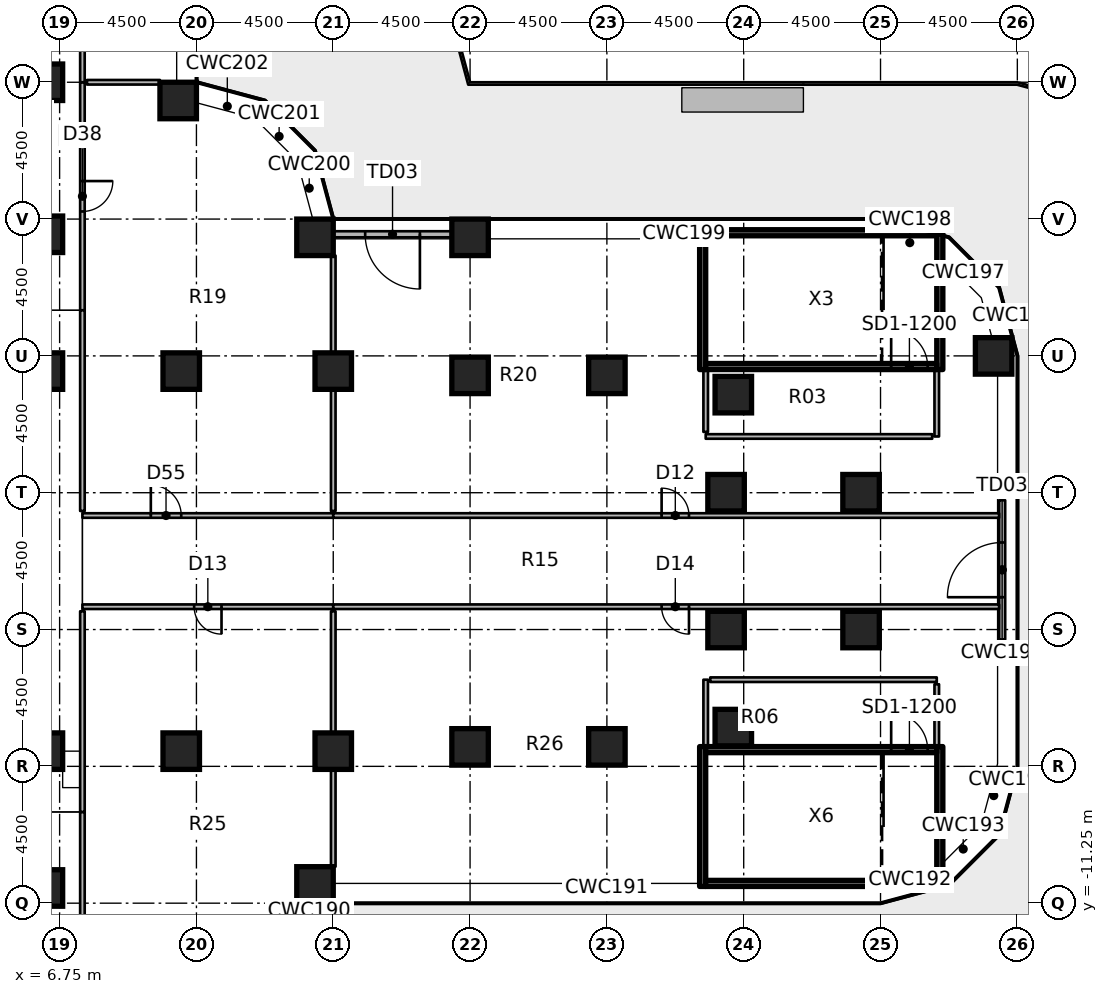
"""IFC4 building model, lengths in metres.
Left out: names, types, materials, properties, quantities, classifications, styles, units other than length and angle.
Written with IfcOpenShell. Run it as: python <this file> out.ifc"""

import sys

from ifc_helpers import new_model, si_unit, direction, frame, frame_2d, origin, origin_2d, place, context, subcontext, project, spatial, rectangle, extrude, element, fill, save


model = new_model("IFC4")
c1 = context("Model", 3, precision=1e-05, world=origin(), true_north=direction((0.0, 1.0)))
c2 = subcontext(c1, "Body", "Model", "MODEL_VIEW")
j1 = project(units=[si_unit("LENGTHUNIT", "METRE"), si_unit("PLANEANGLEUNIT", "RADIAN")], contexts=[c1])
p1 = place(None, origin())
s1 = spatial("IfcSite", under=j1, at=p1, CompositionType="ELEMENT")
p2 = place(p1, origin())
s2 = spatial("IfcBuilding", under=s1, at=p2, CompositionType="ELEMENT")
p3 = place(p2, frame((0.0, 0.0, 22.0)))
s3 = spatial("IfcBuildingStorey", under=s2, at=p3, CompositionType="ELEMENT", Elevation=22.0)
for number, where, z_axis, x_axis in (
    (1, (6.25, -10.75, 0.0), (0.0, 0.0, 1.0), (1.0, 0.0, 0.0)),
    (2, (6.25, -6.25, 0.0), (0.0, 0.0, 1.0), (1.0, 0.0, 0.0)),
    (3, (6.25, 6.25, 0.0), (0.0, 0.0, 1.0), (1.0, 0.0, 0.0)),
    (4, (6.25, 10.75, 0.0), (0.0, 0.0, 1.0), (1.0, 0.0, 0.0)),
    (5, (6.25, 15.75, 0.0), (0.0, 0.0, 1.0), (1.0, 0.0, 0.0)),
    (6, (10.75, -6.25, 0.0), (0.0, 0.0, 1.0), (1.0, 0.0, 0.0)),
    (7, (10.75, 6.25, 0.0), (0.0, 0.0, 1.0), (1.0, 0.0, 0.0)),
):
    element("IfcColumn", number, at=place(p3, frame(where, z_axis=z_axis, x_axis=x_axis)), inside=s3, PredefinedType="COLUMN", context=c2, shape_type="SweptSolid", body=[
        extrude(rectangle(XDim=1.2, YDim=1.2, at=origin_2d()), origin(), (0.0, 0.0, 1.0), 4.85),
    ])
for number, where, z_axis, x_axis in (
    (8, (10.65, 15.15, 0.0), (0.0, 0.0, 1.0), (1.0, 0.0, 0.0)),
    (9, (15.15, -10.65, 0.0), (0.0, 0.0, 1.0), (1.0, 0.0, 0.0)),
):
    element("IfcColumn", number, at=place(p3, frame(where, z_axis=z_axis, x_axis=x_axis)), inside=s3, PredefinedType="COLUMN", context=c2, shape_type="SweptSolid", body=[
        extrude(rectangle(XDim=1.2, YDim=1.2, at=origin_2d()), origin(), (0.0, 0.0, 1.0), 4.55),
    ])
for number, where, z_axis, x_axis in (
    (10, (15.75, -6.25, 0.0), (0.0, 0.0, 1.0), (1.0, 0.0, 0.0)),
    (11, (15.75, 6.25, 0.0), (0.0, 0.0, 1.0), (1.0, 0.0, 0.0)),
):
    element("IfcColumn", number, at=place(p3, frame(where, z_axis=z_axis, x_axis=x_axis)), inside=s3, PredefinedType="COLUMN", context=c2, shape_type="SweptSolid", body=[
        extrude(rectangle(XDim=1.2, YDim=1.2, at=origin_2d()), origin(), (0.0, 0.0, 1.0), 4.85),
    ])
p4 = place(p3, frame((15.15, 10.65, 0.0), z_axis=(0.0, 0.0, 1.0), x_axis=(1.0, 0.0, 0.0)))
e12 = element("IfcColumn", 12, at=p4, inside=s3, PredefinedType="COLUMN", context=c2, shape_type="SweptSolid", body=[
    extrude(rectangle(XDim=1.2, YDim=1.2, at=origin_2d()), origin(), (0.0, 0.0, 1.0), 4.55),
])
for number, where, z_axis, x_axis in (
    (13, (20.25, -6.11, 0.0), (0.0, 0.0, 1.0), (1.0, 0.0, 0.0)),
    (14, (20.25, 6.11, 0.0), (0.0, 0.0, 1.0), (1.0, 0.0, 0.0)),
):
    element("IfcColumn", number, at=place(p3, frame(where, z_axis=z_axis, x_axis=x_axis)), inside=s3, PredefinedType="COLUMN", context=c2, shape_type="SweptSolid", body=[
        extrude(rectangle(XDim=1.2, YDim=1.2, at=origin_2d()), origin(), (0.0, 0.0, 1.0), 4.85),
    ])
p5 = place(p3, frame((20.25, 10.65, 0.0), z_axis=(0.0, 0.0, 1.0), x_axis=(1.0, 0.0, 0.0)))
e15 = element("IfcColumn", 15, at=p5, inside=s3, PredefinedType="COLUMN", context=c2, shape_type="SweptSolid", body=[
    extrude(rectangle(XDim=1.2, YDim=1.2, at=origin_2d()), origin(), (0.0, 0.0, 1.0), 4.55),
])
for number, where, z_axis, x_axis in (
    (16, (24.75, -6.11, 0.0), (0.0, 0.0, 1.0), (1.0, 0.0, 0.0)),
    (17, (24.75, 6.11, 0.0), (0.0, 0.0, 1.0), (1.0, 0.0, 0.0)),
    (18, (28.908, -5.475, 0.0), (0.0, 0.0, 1.0), (1.0, 0.0, 0.0)),
    (19, (28.67, -2.25, 0.0), (0.0, 0.0, 1.0), (1.0, 0.0, 0.0)),
    (20, (28.67, 2.25, 0.0), (0.0, 0.0, 1.0), (1.0, 0.0, 0.0)),
    (21, (28.908, 5.475, 0.0), (0.0, 0.0, 1.0), (1.0, 0.0, 0.0)),
    (22, (33.11, -2.25, 0.0), (0.0, 0.0, 1.0), (1.0, 0.0, 0.0)),
    (23, (33.11, 2.25, 0.0), (0.0, 0.0, 1.0), (1.0, 0.0, 0.0)),
):
    element("IfcColumn", number, at=place(p3, frame(where, z_axis=z_axis, x_axis=x_axis)), inside=s3, PredefinedType="COLUMN", context=c2, shape_type="SweptSolid", body=[
        extrude(rectangle(XDim=1.2, YDim=1.2, at=origin_2d()), origin(), (0.0, 0.0, 1.0), 4.85),
    ])
p6 = place(p3, frame((37.47, 6.75, 0.0), z_axis=(0.0, 0.0, 1.0), x_axis=(1.0, 0.0, 0.0)))
e24 = element("IfcColumn", 24, at=p6, inside=s3, PredefinedType="COLUMN", context=c2, shape_type="SweptSolid", body=[
    extrude(rectangle(XDim=1.2, YDim=1.2, at=origin_2d()), origin(), (0.0, 0.0, 1.0), 4.55),
])
p7 = place(p3, frame((37.75, -2.577, 0.0), z_axis=(0.0, 0.0, 1.0), x_axis=(0.0, 1.0, 0.0)))
e25 = element("IfcWall", 25, at=p7, inside=s3, PredefinedType="SOLIDWALL", context=c2, shape_type="SweptSolid", body=[
    extrude(rectangle(XDim=4.58, YDim=0.2, at=frame_2d((2.29, 0.0))), origin(), (0.0, 0.0, 1.0), 3.95),
])
p8 = place(p7, frame((1.39, 0.0, 0.0)))
e26 = element("IfcOpeningElement", 26, at=p8, cuts=e25, PredefinedType="OPENING", context=c2, shape_type="SweptSolid", body=[
    extrude(rectangle(XDim=1.8, YDim=2.4, at=frame_2d((0.9, 1.2))), frame((0.0, 0.11, 0.0), z_axis=(0.0, -1.0, 0.0), x_axis=(1.0, 0.0, 0.0)), (0.0, 0.0, 1.0), 0.22),
])
p9 = place(p3, frame((19.65, 10.75, 0.0), z_axis=(0.0, 0.0, 1.0), x_axis=(-1.0, 0.0, 0.0)))
e27 = element("IfcWall", 27, at=p9, inside=s3, PredefinedType="SOLIDWALL", context=c2, shape_type="SweptSolid", body=[
    extrude(rectangle(XDim=3.9, YDim=0.2, at=frame_2d((1.95, 0.0))), origin(), (0.0, 0.0, 1.0), 3.95),
])
p10 = place(p9, frame((1.05, 0.0, 0.0)))
e28 = element("IfcOpeningElement", 28, at=p10, cuts=e27, PredefinedType="OPENING", context=c2, shape_type="SweptSolid", body=[
    extrude(rectangle(XDim=1.8, YDim=2.4, at=frame_2d((0.9, 1.2))), frame((0.0, 0.11, 0.0), z_axis=(0.0, -1.0, 0.0), x_axis=(1.0, 0.0, 0.0)), (0.0, 0.0, 1.0), 0.22),
])
for number, where, z_axis, x_axis in (
    (29, (27.9, 6.3, 0.0), (0.0, 0.0, 1.0), (0.0, 1.0, 0.0)),
    (30, (35.7, 6.3, 0.0), (0.0, 0.0, 1.0), (0.0, 1.0, 0.0)),
):
    element("IfcWall", number, at=place(p3, frame(where, z_axis=z_axis, x_axis=x_axis)), inside=s3, PredefinedType="SHEAR", context=c2, shape_type="SweptSolid", body=[
        extrude(rectangle(XDim=4.6, YDim=0.2, at=frame_2d((2.3, 0.0))), origin(), (0.0, 0.0, 1.0), 4.55),
    ])
p11 = place(p3, frame((28.0, 6.4, 0.0), z_axis=(0.0, 0.0, 1.0), x_axis=(1.0, 0.0, 0.0)))
e31 = element("IfcWall", 31, at=p11, inside=s3, PredefinedType="SHEAR", context=c2, shape_type="SweptSolid", body=[
    extrude(rectangle(XDim=7.6, YDim=0.2, at=frame_2d((3.8, 0.0))), origin(), (0.0, 0.0, 1.0), 4.55),
])
p12 = place(p11, frame((6.1, 0.0, 0.0)))
e32 = element("IfcOpeningElement", 32, at=p12, cuts=e31, PredefinedType="OPENING", context=c2, shape_type="SweptSolid", body=[
    extrude(rectangle(XDim=1.2, YDim=2.1, at=frame_2d((0.6, 1.05))), frame((0.0, 0.11, 0.0), z_axis=(0.0, -1.0, 0.0), x_axis=(1.0, 0.0, 0.0)), (0.0, 0.0, 1.0), 0.22),
])
p13 = place(p3, frame((28.0, 10.8, 0.0), z_axis=(0.0, 0.0, 1.0), x_axis=(1.0, 0.0, 0.0)))
e33 = element("IfcWall", 33, at=p13, inside=s3, PredefinedType="SHEAR", context=c2, shape_type="SweptSolid", body=[
    extrude(rectangle(XDim=7.6, YDim=0.2, at=frame_2d((3.8, 0.0))), origin(), (0.0, 0.0, 1.0), 4.55),
])
for number, where, z_axis, x_axis in (
    (34, (27.9, -10.7, 0.0), (0.0, 0.0, 1.0), (0.0, 1.0, 0.0)),
    (35, (35.7, -10.7, 0.0), (0.0, 0.0, 1.0), (0.0, 1.0, 0.0)),
):
    element("IfcWall", number, at=place(p3, frame(where, z_axis=z_axis, x_axis=x_axis)), inside=s3, PredefinedType="SHEAR", context=c2, shape_type="SweptSolid", body=[
        extrude(rectangle(XDim=4.6, YDim=0.2, at=frame_2d((2.3, 0.0))), origin(), (0.0, 0.0, 1.0), 4.55),
    ])
p14 = place(p3, frame((28.0, -10.6, 0.0), z_axis=(0.0, 0.0, 1.0), x_axis=(1.0, 0.0, 0.0)))
e36 = element("IfcWall", 36, at=p14, inside=s3, PredefinedType="SHEAR", context=c2, shape_type="SweptSolid", body=[
    extrude(rectangle(XDim=7.6, YDim=0.2, at=frame_2d((3.8, 0.0))), origin(), (0.0, 0.0, 1.0), 4.55),
])
p15 = place(p3, frame((28.0, -6.2, 0.0), z_axis=(0.0, 0.0, 1.0), x_axis=(1.0, 0.0, 0.0)))
e37 = element("IfcWall", 37, at=p15, inside=s3, PredefinedType="SHEAR", context=c2, shape_type="SweptSolid", body=[
    extrude(rectangle(XDim=7.6, YDim=0.2, at=frame_2d((3.8, 0.0))), origin(), (0.0, 0.0, 1.0), 4.55),
])
p16 = place(p15, frame((6.1, 0.0, 0.0)))
e38 = element("IfcOpeningElement", 38, at=p16, cuts=e37, PredefinedType="OPENING", context=c2, shape_type="SweptSolid", body=[
    extrude(rectangle(XDim=1.2, YDim=2.1, at=frame_2d((0.6, 1.05))), frame((0.0, 0.11, 0.0), z_axis=(0.0, -1.0, 0.0), x_axis=(1.0, 0.0, 0.0)), (0.0, 0.0, 1.0), 0.22),
])
p17 = place(p3, frame((35.6, 6.3, 0.0), z_axis=(0.0, 0.0, 1.0), x_axis=(0.0, -1.0, 0.0)))
e39 = element("IfcWall", 39, at=p17, inside=s3, PredefinedType="PARTITIONING", context=c2, shape_type="SweptSolid", body=[
    extrude(rectangle(XDim=2.2, YDim=0.15, at=frame_2d((1.1, 0.0))), origin(), (0.0, 0.0, 1.0), 4.55),
])
p18 = place(p3, frame((35.45, 4.1, 0.0), z_axis=(0.0, 0.0, 1.0), x_axis=(-1.0, 0.0, 0.0)))
e40 = element("IfcWall", 40, at=p18, inside=s3, PredefinedType="PARTITIONING", context=c2, shape_type="SweptSolid", body=[
    extrude(rectangle(XDim=7.45, YDim=0.15, at=frame_2d((3.725, 0.0))), origin(), (0.0, 0.0, 1.0), 3.93),
])
p19 = place(p3, frame((28.0, 4.25, 0.0), z_axis=(0.0, 0.0, 1.0), x_axis=(0.0, 1.0, 0.0)))
e41 = element("IfcWall", 41, at=p19, inside=s3, PredefinedType="PARTITIONING", context=c2, shape_type="SweptSolid", body=[
    extrude(rectangle(XDim=2.05, YDim=0.15, at=frame_2d((1.025, 0.0))), origin(), (0.0, 0.0, 1.0), 3.93),
])
p20 = place(p3, frame((28.0, -6.1, 0.0), z_axis=(0.0, 0.0, 1.0), x_axis=(0.0, 1.0, 0.0)))
e42 = element("IfcWall", 42, at=p20, inside=s3, PredefinedType="PARTITIONING", context=c2, shape_type="SweptSolid", body=[
    extrude(rectangle(XDim=2.2, YDim=0.15, at=frame_2d((1.1, 0.0))), origin(), (0.0, 0.0, 1.0), 3.93),
])
p21 = place(p3, frame((28.15, -3.9, 0.0), z_axis=(0.0, 0.0, 1.0), x_axis=(1.0, 0.0, 0.0)))
e43 = element("IfcWall", 43, at=p21, inside=s3, PredefinedType="PARTITIONING", context=c2, shape_type="SweptSolid", body=[
    extrude(rectangle(XDim=7.45, YDim=0.15, at=frame_2d((3.725, 0.0))), origin(), (0.0, 0.0, 1.0), 3.93),
])
p22 = place(p3, frame((35.6, -4.05, 0.0), z_axis=(0.0, 0.0, 1.0), x_axis=(0.0, -1.0, 0.0)))
e44 = element("IfcWall", 44, at=p22, inside=s3, PredefinedType="PARTITIONING", context=c2, shape_type="SweptSolid", body=[
    extrude(rectangle(XDim=2.05, YDim=0.15, at=frame_2d((1.025, 0.0))), origin(), (0.0, 0.0, 1.0), 4.55),
])
p23 = place(p3, frame((7.5, 15.75, 0.0), z_axis=(0.0, 0.0, 1.0), x_axis=(0.0, -1.0, 0.0)))
e45 = element("IfcWall", 45, at=p23, inside=s3, PredefinedType="PARTITIONING", context=c2, shape_type="SweptSolid", body=[
    extrude(rectangle(XDim=7.5, YDim=0.15, at=frame_2d((3.75, 0.0))), origin(), (0.0, 0.0, 1.0), 3.93),
])
p24 = place(p23, frame((3.25, 0.0, 0.0)))
e46 = element("IfcOpeningElement", 46, at=p24, cuts=e45, PredefinedType="OPENING", context=c2, shape_type="SweptSolid", body=[
    extrude(rectangle(XDim=1.0, YDim=2.1, at=frame_2d((0.5, 1.05))), frame((0.0, 0.085, 0.0), z_axis=(0.0, -1.0, 0.0), x_axis=(1.0, 0.0, 0.0)), (0.0, 0.0, 1.0), 0.17),
])
p25 = place(p3, frame((7.5, 30.0, 0.0), z_axis=(0.0, 0.0, 1.0), x_axis=(0.0, -1.0, 0.0)))
e47 = element("IfcWall", 47, at=p25, inside=s3, PredefinedType="PARTITIONING", context=c2, shape_type="SweptSolid", body=[
    extrude(rectangle(XDim=14.25, YDim=0.15, at=frame_2d((7.125, 0.0))), origin(), (0.0, 0.0, 1.0), 4.55),
])
p26 = place(p25, frame((6.675, 0.0, 0.0)))
e48 = element("IfcOpeningElement", 48, at=p26, cuts=e47, PredefinedType="OPENING", context=c2, shape_type="SweptSolid", body=[
    extrude(rectangle(XDim=0.9, YDim=2.1, at=frame_2d((0.45, 1.05))), frame((0.0, 0.085, 0.0), z_axis=(0.0, -1.0, 0.0), x_axis=(1.0, 0.0, 0.0)), (0.0, 0.0, 1.0), 0.17),
])
p27 = place(p3, frame((7.5, -8.25, 0.0), z_axis=(0.0, 0.0, 1.0), x_axis=(0.0, -1.0, 0.0)))
e49 = element("IfcWall", 49, at=p27, inside=s3, PredefinedType="PARTITIONING", context=c2, shape_type="SweptSolid", body=[
    extrude(rectangle(XDim=7.5, YDim=0.15, at=frame_2d((3.75, 0.0))), origin(), (0.0, 0.0, 1.0), 3.93),
])
p28 = place(p3, frame((7.5, 1.5, 0.0), z_axis=(0.0, 0.0, 1.0), x_axis=(1.0, 0.0, 0.0)))
e50 = element("IfcWall", 50, at=p28, inside=s3, PredefinedType="PARTITIONING", context=c2, shape_type="SweptSolid", body=[
    extrude(rectangle(XDim=8.25, YDim=0.15, at=frame_2d((4.125, 0.0))), origin(), (0.0, 0.0, 1.0), 4.063),
])
p29 = place(p28, frame((2.25, 0.0, 0.0)))
e51 = element("IfcOpeningElement", 51, at=p29, cuts=e50, PredefinedType="OPENING", context=c2, shape_type="SweptSolid", body=[
    extrude(rectangle(XDim=1.0, YDim=2.1, at=frame_2d((0.5, 1.05))), frame((0.0, 0.085, 0.0), z_axis=(0.0, -1.0, 0.0), x_axis=(1.0, 0.0, 0.0)), (0.0, 0.0, 1.0), 0.17),
])
p30 = place(p3, frame((15.75, 1.5, 0.0), z_axis=(0.0, 0.0, 1.0), x_axis=(1.0, 0.0, 0.0)))
e52 = element("IfcWall", 52, at=p30, inside=s3, PredefinedType="PARTITIONING", context=c2, shape_type="SweptSolid", body=[
    extrude(rectangle(XDim=21.9, YDim=0.15, at=frame_2d((10.95, 0.0))), origin(), (0.0, 0.0, 1.0), 3.93),
])
p31 = place(p30, frame((10.8, 0.0, 0.0)))
e53 = element("IfcOpeningElement", 53, at=p31, cuts=e52, PredefinedType="OPENING", context=c2, shape_type="SweptSolid", body=[
    extrude(rectangle(XDim=0.9, YDim=2.1, at=frame_2d((0.45, 1.05))), frame((0.0, 0.085, 0.0), z_axis=(0.0, -1.0, 0.0), x_axis=(1.0, 0.0, 0.0)), (0.0, 0.0, 1.0), 0.17),
])
p32 = place(p3, frame((15.75, -1.5, 0.0), z_axis=(0.0, 0.0, 1.0), x_axis=(-1.0, 0.0, 0.0)))
e54 = element("IfcWall", 54, at=p32, inside=s3, PredefinedType="PARTITIONING", context=c2, shape_type="SweptSolid", body=[
    extrude(rectangle(XDim=8.25, YDim=0.15, at=frame_2d((4.125, 0.0))), origin(), (0.0, 0.0, 1.0), 4.063),
])
p33 = place(p32, frame((3.675, 0.0, 0.0)))
e55 = element("IfcOpeningElement", 55, at=p33, cuts=e54, PredefinedType="OPENING", context=c2, shape_type="SweptSolid", body=[
    extrude(rectangle(XDim=0.9, YDim=2.1, at=frame_2d((0.45, 1.05))), frame((0.0, 0.085, 0.0), z_axis=(0.0, -1.0, 0.0), x_axis=(1.0, 0.0, 0.0)), (0.0, 0.0, 1.0), 0.17),
])
p34 = place(p3, frame((37.65, -1.5, 0.0), z_axis=(0.0, 0.0, 1.0), x_axis=(-1.0, 0.0, 0.0)))
e56 = element("IfcWall", 56, at=p34, inside=s3, PredefinedType="PARTITIONING", context=c2, shape_type="SweptSolid", body=[
    extrude(rectangle(XDim=21.9, YDim=0.15, at=frame_2d((10.95, 0.0))), origin(), (0.0, 0.0, 1.0), 3.93),
])
p35 = place(p34, frame((10.2, 0.0, 0.0)))
e57 = element("IfcOpeningElement", 57, at=p35, cuts=e56, PredefinedType="OPENING", context=c2, shape_type="SweptSolid", body=[
    extrude(rectangle(XDim=0.9, YDim=2.1, at=frame_2d((0.45, 1.05))), frame((0.0, 0.085, 0.0), z_axis=(0.0, -1.0, 0.0), x_axis=(1.0, 0.0, 0.0)), (0.0, 0.0, 1.0), 0.17),
])
p36 = place(p3, frame((15.75, 10.05, 0.0), z_axis=(0.0, 0.0, 1.0), x_axis=(0.0, -1.0, 0.0)))
e58 = element("IfcWall", 58, at=p36, inside=s3, PredefinedType="PARTITIONING", context=c2, shape_type="SweptSolid", body=[
    extrude(rectangle(XDim=3.2, YDim=0.15, at=frame_2d((1.6, 0.0))), origin(), (0.0, 0.0, 1.0), 4.55),
])
p37 = place(p3, frame((15.75, 5.65, 0.0), z_axis=(0.0, 0.0, 1.0), x_axis=(0.0, -1.0, 0.0)))
e59 = element("IfcWall", 59, at=p37, inside=s3, PredefinedType="PARTITIONING", context=c2, shape_type="SweptSolid", body=[
    extrude(rectangle(XDim=4.0, YDim=0.15, at=frame_2d((2.0, 0.0))), origin(), (0.0, 0.0, 1.0), 4.063),
])
p38 = place(p3, frame((7.65, 15.75, 0.0), z_axis=(0.0, 0.0, 1.0), x_axis=(1.0, 0.0, 0.0)))
e60 = element("IfcWall", 60, at=p38, inside=s3, PredefinedType="PARTITIONING", context=c2, shape_type="SweptSolid", body=[
    extrude(rectangle(XDim=2.4, YDim=0.15, at=frame_2d((1.2, 0.0))), origin(), (0.0, 0.0, 1.0), 4.55),
])
p39 = place(p3, frame((7.5, 1.65, 0.0), z_axis=(0.0, 0.0, 1.0), x_axis=(0.0, 1.0, 0.0)))
e61 = element("IfcWall", 61, at=p39, inside=s3, PredefinedType="PARTITIONING", context=c2, shape_type="SweptSolid", body=[
    extrude(rectangle(XDim=6.6, YDim=0.15, at=frame_2d((3.3, 0.0))), origin(), (0.0, 0.0, 1.0), 3.911),
])
p40 = place(p3, frame((15.75, -1.65, 0.0), z_axis=(0.0, 0.0, 1.0), x_axis=(0.0, -1.0, 0.0)))
e62 = element("IfcWall", 62, at=p40, inside=s3, PredefinedType="PARTITIONING", context=c2, shape_type="SweptSolid", body=[
    extrude(rectangle(XDim=4.0, YDim=0.15, at=frame_2d((2.0, 0.0))), origin(), (0.0, 0.0, 1.0), 4.063),
])
p41 = place(p3, frame((15.75, -6.85, 0.0), z_axis=(0.0, 0.0, 1.0), x_axis=(0.0, -1.0, 0.0)))
e63 = element("IfcWall", 63, at=p41, inside=s3, PredefinedType="PARTITIONING", context=c2, shape_type="SweptSolid", body=[
    extrude(rectangle(XDim=3.2, YDim=0.15, at=frame_2d((1.6, 0.0))), origin(), (0.0, 0.0, 1.0), 4.55),
])
p42 = place(p3, frame((7.5, -8.25, 0.0), z_axis=(0.0, 0.0, 1.0), x_axis=(0.0, 1.0, 0.0)))
e64 = element("IfcWall", 64, at=p42, inside=s3, PredefinedType="PARTITIONING", context=c2, shape_type="SweptSolid", body=[
    extrude(rectangle(XDim=6.6, YDim=0.15, at=frame_2d((3.3, 0.0))), origin(), (0.0, 0.0, 1.0), 3.911),
])
p43 = place(p8, origin())
e65 = element("IfcDoor", 65, at=p43, inside=s3, OperationType="SINGLE_SWING_LEFT", PredefinedType="DOOR", context=c2, shape_type="SweptSolid", body=[
    extrude(rectangle(XDim=1.8, YDim=2.4, at=frame_2d((0.9, 1.2))), frame((0.0, 0.025, 0.0), z_axis=(0.0, -1.0, 0.0), x_axis=(1.0, 0.0, 0.0)), (0.0, 0.0, 1.0), 0.05),
])
fill(e26, e65)
p44 = place(p10, origin())
e66 = element("IfcDoor", 66, at=p44, inside=s3, OperationType="SINGLE_SWING_LEFT", PredefinedType="DOOR", context=c2, shape_type="SweptSolid", body=[
    extrude(rectangle(XDim=1.8, YDim=2.4, at=frame_2d((0.9, 1.2))), frame((0.0, 0.025, 0.0), z_axis=(0.0, -1.0, 0.0), x_axis=(1.0, 0.0, 0.0)), (0.0, 0.0, 1.0), 0.05),
])
fill(e28, e66)
p45 = place(p12, origin())
e67 = element("IfcDoor", 67, at=p45, inside=s3, OperationType="SINGLE_SWING_RIGHT", PredefinedType="DOOR", context=c2, shape_type="SweptSolid", body=[
    extrude(rectangle(XDim=1.2, YDim=2.1, at=frame_2d((0.6, 1.05))), frame((0.0, 0.025, 0.0), z_axis=(0.0, -1.0, 0.0), x_axis=(1.0, 0.0, 0.0)), (0.0, 0.0, 1.0), 0.05),
])
fill(e32, e67)
p46 = place(p16, origin())
e68 = element("IfcDoor", 68, at=p46, inside=s3, OperationType="SINGLE_SWING_RIGHT", PredefinedType="DOOR", context=c2, shape_type="SweptSolid", body=[
    extrude(rectangle(XDim=1.2, YDim=2.1, at=frame_2d((0.6, 1.05))), frame((0.0, 0.025, 0.0), z_axis=(0.0, -1.0, 0.0), x_axis=(1.0, 0.0, 0.0)), (0.0, 0.0, 1.0), 0.05),
])
fill(e38, e68)
p47 = place(p24, origin())
e69 = element("IfcDoor", 69, at=p47, inside=s3, OperationType="SINGLE_SWING_LEFT", PredefinedType="DOOR", context=c2, shape_type="SweptSolid", body=[
    extrude(rectangle(XDim=1.0, YDim=2.1, at=frame_2d((0.5, 1.05))), frame((0.0, 0.025, 0.0), z_axis=(0.0, -1.0, 0.0), x_axis=(1.0, 0.0, 0.0)), (0.0, 0.0, 1.0), 0.05),
])
fill(e46, e69)
p48 = place(p29, origin())
e70 = element("IfcDoor", 70, at=p48, inside=s3, OperationType="SINGLE_SWING_LEFT", PredefinedType="DOOR", context=c2, shape_type="SweptSolid", body=[
    extrude(rectangle(XDim=1.0, YDim=2.1, at=frame_2d((0.5, 1.05))), frame((0.0, 0.025, 0.0), z_axis=(0.0, -1.0, 0.0), x_axis=(1.0, 0.0, 0.0)), (0.0, 0.0, 1.0), 0.05),
])
fill(e51, e70)
p49 = place(p31, origin())
e71 = element("IfcDoor", 71, at=p49, inside=s3, OperationType="SINGLE_SWING_LEFT", PredefinedType="DOOR", context=c2, shape_type="SweptSolid", body=[
    extrude(rectangle(XDim=0.9, YDim=2.1, at=frame_2d((0.45, 1.05))), frame((0.0, 0.025, 0.0), z_axis=(0.0, -1.0, 0.0), x_axis=(1.0, 0.0, 0.0)), (0.0, 0.0, 1.0), 0.05),
])
fill(e53, e71)
p50 = place(p33, origin())
e72 = element("IfcDoor", 72, at=p50, inside=s3, OperationType="SINGLE_SWING_LEFT", PredefinedType="DOOR", context=c2, shape_type="SweptSolid", body=[
    extrude(rectangle(XDim=0.9, YDim=2.1, at=frame_2d((0.45, 1.05))), frame((0.0, 0.025, 0.0), z_axis=(0.0, -1.0, 0.0), x_axis=(1.0, 0.0, 0.0)), (0.0, 0.0, 1.0), 0.05),
])
fill(e55, e72)
p51 = place(p35, origin())
e73 = element("IfcDoor", 73, at=p51, inside=s3, OperationType="SINGLE_SWING_LEFT", PredefinedType="DOOR", context=c2, shape_type="SweptSolid", body=[
    extrude(rectangle(XDim=0.9, YDim=2.1, at=frame_2d((0.45, 1.05))), frame((0.0, 0.025, 0.0), z_axis=(0.0, -1.0, 0.0), x_axis=(1.0, 0.0, 0.0)), (0.0, 0.0, 1.0), 0.05),
])
fill(e57, e73)
save(model, sys.argv[1])
